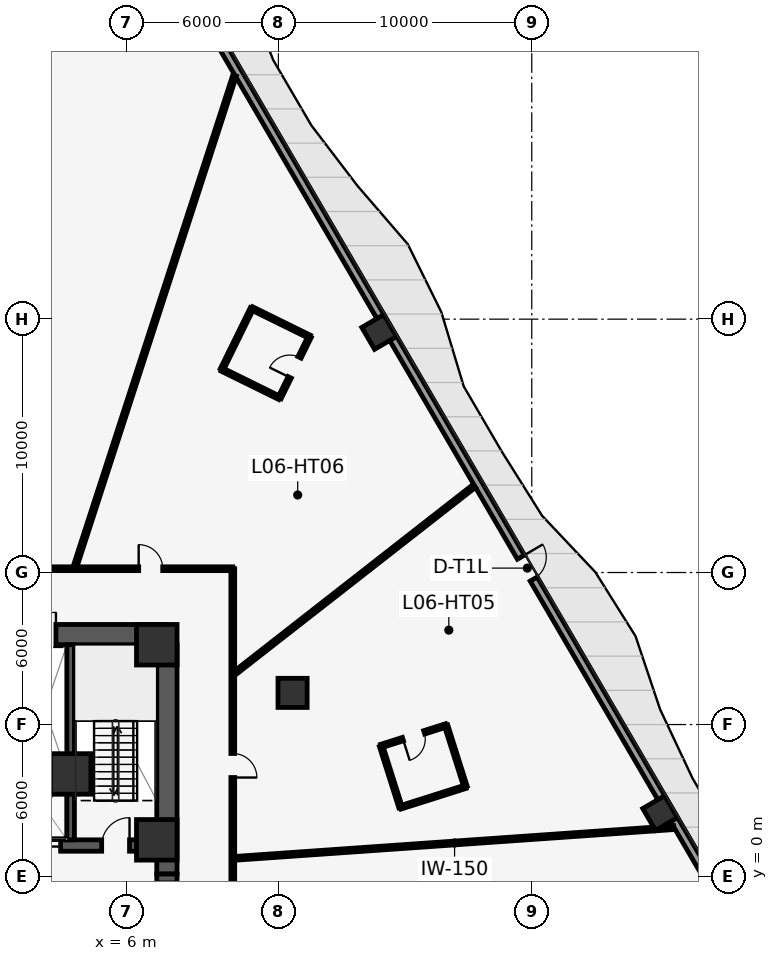
"""IFC4 building model, lengths in metres.
Left out: names, types, materials, properties, quantities, classifications, styles, units other than length and angle.
Written with IfcOpenShell. Run it as: python <this file> out.ifc"""

import sys

from ifc_helpers import new_model, si_unit, direction, frame, frame_2d, origin, origin_2d, place, context, subcontext, project, spatial, rectangle, hollow_rectangle, extrude, element, fill, save


model = new_model("IFC4")
c1 = context("Model", 3, precision=1e-05, world=origin(), true_north=direction((0.0, 1.0)))
c2 = subcontext(c1, "Body", "Model", "MODEL_VIEW")
j1 = project(units=[si_unit("LENGTHUNIT", "METRE"), si_unit("PLANEANGLEUNIT", "RADIAN")], contexts=[c1])
p1 = place(None, origin())
s1 = spatial("IfcSite", under=j1, at=p1, CompositionType="ELEMENT")
p2 = place(p1, origin())
s2 = spatial("IfcBuilding", under=s1, at=p2, CompositionType="ELEMENT")
p3 = place(p2, frame((0.0, 0.0, 34.4)))
s3 = spatial("IfcBuildingStorey", under=s2, at=p3, CompositionType="ELEMENT", Elevation=34.4)
p4 = place(p3, frame((-7.6, 9.55, 0.0), z_axis=(0.0, 0.0, 1.0), x_axis=(1.0, 0.0, 0.0)))
e1 = element("IfcWall", 1, at=p4, inside=s3, PredefinedType="SHEAR", context=c2, shape_type="SweptSolid", body=[
    extrude(rectangle(XDim=15.2, YDim=0.8, at=frame_2d((7.6, 0.0))), origin(), (0.0, 0.0, 1.0), 3.75),
])
p5 = place(p4, frame((7.05, 0.0, 0.0)))
e2 = element("IfcOpeningElement", 2, at=p5, cuts=e1, PredefinedType="OPENING", context=c2, shape_type="SweptSolid", body=[
    extrude(rectangle(XDim=1.1, YDim=2.15, at=frame_2d((0.55, 1.075))), frame((0.0, 0.41, 0.0), z_axis=(0.0, -1.0, 0.0), x_axis=(1.0, 0.0, 0.0)), (0.0, 0.0, 1.0), 0.82),
])
p6 = place(p4, frame((4.38, 0.0, 0.0)))
e3 = element("IfcOpeningElement", 3, at=p6, cuts=e1, PredefinedType="OPENING", context=c2, shape_type="SweptSolid", body=[
    extrude(rectangle(XDim=0.88, YDim=2.15, at=frame_2d((0.44, 1.075))), frame((0.0, 0.41, 0.0), z_axis=(0.0, -1.0, 0.0), x_axis=(1.0, 0.0, 0.0)), (0.0, 0.0, 1.0), 0.82),
])
p7 = place(p4, frame((9.94, 0.0, 0.0)))
e4 = element("IfcOpeningElement", 4, at=p7, cuts=e1, PredefinedType="OPENING", context=c2, shape_type="SweptSolid", body=[
    extrude(rectangle(XDim=0.88, YDim=2.15, at=frame_2d((0.44, 1.075))), frame((0.0, 0.41, 0.0), z_axis=(0.0, -1.0, 0.0), x_axis=(1.0, 0.0, 0.0)), (0.0, 0.0, 1.0), 0.82),
])
p8 = place(p3, frame((-7.2, 1.225, 0.0), z_axis=(0.0, 0.0, 1.0), x_axis=(1.0, 0.0, 0.0)))
e5 = element("IfcWall", 5, at=p8, inside=s3, PredefinedType="SHEAR", context=c2, shape_type="SweptSolid", body=[
    extrude(rectangle(XDim=14.4, YDim=0.45, at=frame_2d((7.2, 0.0))), origin(), (0.0, 0.0, 1.0), 3.75),
])
p9 = place(p8, frame((3.795, 0.0, 0.0)))
e6 = element("IfcOpeningElement", 6, at=p9, cuts=e5, PredefinedType="OPENING", context=c2, shape_type="SweptSolid", body=[
    extrude(rectangle(XDim=1.25, YDim=2.25, at=frame_2d((0.625, 1.125))), frame((0.0, 0.235, 0.0), z_axis=(0.0, -1.0, 0.0), x_axis=(1.0, 0.0, 0.0)), (0.0, 0.0, 1.0), 0.47),
])
p10 = place(p8, frame((9.355, 0.0, 0.0)))
e7 = element("IfcOpeningElement", 7, at=p10, cuts=e5, PredefinedType="OPENING", context=c2, shape_type="SweptSolid", body=[
    extrude(rectangle(XDim=1.25, YDim=2.25, at=frame_2d((0.625, 1.125))), frame((0.0, 0.235, 0.0), z_axis=(0.0, -1.0, 0.0), x_axis=(1.0, 0.0, 0.0)), (0.0, 0.0, 1.0), 0.47),
])
p11 = place(p8, frame((1.075, 0.0, 0.0)))
e8 = element("IfcOpeningElement", 8, at=p11, cuts=e5, PredefinedType="OPENING", context=c2, shape_type="SweptSolid", body=[
    extrude(rectangle(XDim=1.1, YDim=2.15, at=frame_2d((0.55, 1.075))), frame((0.0, 0.235, 0.0), z_axis=(0.0, -1.0, 0.0), x_axis=(1.0, 0.0, 0.0)), (0.0, 0.0, 1.0), 0.47),
])
p12 = place(p8, frame((12.225, 0.0, 0.0)))
e9 = element("IfcOpeningElement", 9, at=p12, cuts=e5, PredefinedType="OPENING", context=c2, shape_type="SweptSolid", body=[
    extrude(rectangle(XDim=1.1, YDim=2.15, at=frame_2d((0.55, 1.075))), frame((0.0, 0.235, 0.0), z_axis=(0.0, -1.0, 0.0), x_axis=(1.0, 0.0, 0.0)), (0.0, 0.0, 1.0), 0.47),
])
p13 = place(p3, frame((3.8, 1.45, 0.0), z_axis=(0.0, 0.0, 1.0), x_axis=(0.0, 1.0, 0.0)))
e10 = element("IfcWall", 10, at=p13, inside=s3, PredefinedType="SHEAR", context=c2, shape_type="SweptSolid", body=[
    extrude(rectangle(XDim=7.7, YDim=0.3, at=frame_2d((3.85, 0.0))), origin(), (0.0, 0.0, 1.0), 3.75),
])
p14 = place(p3, frame((7.6, 0.1, 0.0), z_axis=(0.0, 0.0, 1.0), x_axis=(0.0, 1.0, 0.0)))
e11 = element("IfcWall", 11, at=p14, inside=s3, PredefinedType="SHEAR", context=c2, shape_type="SweptSolid", body=[
    extrude(rectangle(XDim=9.05, YDim=0.8, at=frame_2d((4.525, 0.0))), origin(), (0.0, 0.0, 1.0), 3.75),
])
p15 = place(p3, frame((7.6, -8.85, 0.0), z_axis=(0.0, 0.0, 1.0), x_axis=(0.0, 1.0, 0.0)))
e12 = element("IfcWall", 12, at=p15, inside=s3, PredefinedType="SHEAR", context=c2, shape_type="SweptSolid", body=[
    extrude(rectangle(XDim=8.95, YDim=0.8, at=frame_2d((4.475, 0.0))), origin(), (0.0, 0.0, 1.0), 3.75),
])
p16 = place(p15, frame((2.49, 0.0, 0.0)))
e13 = element("IfcOpeningElement", 13, at=p16, cuts=e12, PredefinedType="OPENING", context=c2, shape_type="SweptSolid", body=[
    extrude(rectangle(XDim=1.8, YDim=2.2, at=frame_2d((0.9, 1.1))), frame((0.0, 0.41, 0.0), z_axis=(0.0, -1.0, 0.0), x_axis=(1.0, 0.0, 0.0)), (0.0, 0.0, 1.0), 0.82),
])
p17 = place(p15, frame((7.4, 0.0, 0.0)))
e14 = element("IfcOpeningElement", 14, at=p17, cuts=e12, PredefinedType="OPENING", context=c2, shape_type="SweptSolid", body=[
    extrude(rectangle(XDim=1.2, YDim=2.15, at=frame_2d((0.6, 1.075))), frame((0.0, 0.41, 0.0), z_axis=(0.0, -1.0, 0.0), x_axis=(1.0, 0.0, 0.0)), (0.0, 0.0, 1.0), 0.82),
])
for number, where, z_axis, x_axis in (
    (15, (7.2, 1.45, 0.0), (0.0, 0.0, 1.0), (1.0, 0.0, 0.0)),
    (16, (7.2, 9.15, 0.0), (0.0, 0.0, 1.0), (1.0, 0.0, 0.0)),
    (17, (3.8, 4.05, 0.0), (0.0, 0.0, 1.0), (1.0, 0.0, 0.0)),
):
    element("IfcColumn", number, at=place(p3, frame(where, z_axis=z_axis, x_axis=x_axis)), inside=s3, PredefinedType="COLUMN", context=c2, shape_type="SweptSolid", body=[
        extrude(rectangle(XDim=1.6, YDim=1.6, at=origin_2d()), origin(), (0.0, 0.0, 1.0), 4.0),
    ])
p18 = place(p3, frame((12.56, 7.25, 0.0), z_axis=(0.0, 0.0, 1.0), x_axis=(1.0, 0.0, 0.0)))
e18 = element("IfcColumn", 18, at=p18, inside=s3, PredefinedType="COLUMN", context=c2, shape_type="SweptSolid", body=[
    extrude(rectangle(XDim=1.15, YDim=1.15, at=origin_2d()), origin(), (0.0, 0.0, 1.0), 4.0),
])
for number, where, z_axis, x_axis in (
    (19, (27.065, 2.506, 0.0), (0.0, 0.0, 1.0), (-0.504, 0.863, 0.0)),
    (20, (15.976, 21.494, 0.0), (0.0, 0.0, 1.0), (-0.504, 0.863, 0.0)),
):
    element("IfcColumn", number, at=place(p3, frame(where, z_axis=z_axis, x_axis=x_axis)), inside=s3, PredefinedType="COLUMN", context=c2, shape_type="SweptSolid", body=[
        extrude(hollow_rectangle(XDim=1.0, YDim=1.0, WallThickness=0.06, at=origin_2d()), origin(), (0.0, 0.0, 1.0), 4.0),
    ])
p19 = place(p3, frame((4.923, 41.122, 0.0), z_axis=(0.0, 0.0, 1.0), x_axis=(0.504213113214, -0.863579258935, 0.0)))
e21 = element("IfcWall", 21, at=p19, inside=s3, PredefinedType="STANDARD", context=c2, shape_type="SweptSolid", body=[
    extrude(rectangle(XDim=67.041, YDim=0.32, at=frame_2d((33.521, 0.0))), origin(), (0.0, 0.0, 1.0), 3.75),
])
p20 = place(p19, frame((33.021, 0.0, 0.0)))
e22 = element("IfcOpeningElement", 22, at=p20, cuts=e21, PredefinedType="OPENING", context=c2, shape_type="SweptSolid", body=[
    extrude(rectangle(XDim=1.0, YDim=2.15, at=frame_2d((0.5, 1.075))), frame((0.0, 0.17, 0.0), z_axis=(0.0, -1.0, 0.0), x_axis=(1.0, 0.0, 0.0)), (0.0, 0.0, 1.0), 0.34),
])
p21 = place(p3, frame((1.92, 4.05, 0.0), z_axis=(0.0, 0.0, 1.0), x_axis=(1.0, 0.0, 0.0)))
e23 = element("IfcWall", 23, at=p21, inside=s3, PredefinedType="PARTITIONING", context=c2, shape_type="SweptSolid", body=[
    extrude(rectangle(XDim=1.73, YDim=0.2, at=frame_2d((0.865, 0.0))), origin(), (0.0, 0.0, 1.0), 3.75),
])
p22 = place(p3, frame((-10.2, 12.15, 0.0), z_axis=(0.0, 0.0, 1.0), x_axis=(1.0, 0.0, 0.0)))
e24 = element("IfcWall", 24, at=p22, inside=s3, PredefinedType="PARTITIONING", context=c2, shape_type="SweptSolid", body=[
    extrude(rectangle(XDim=20.4, YDim=0.15, at=frame_2d((10.2, 0.0))), origin(), (0.0, 0.0, 1.0), 3.75),
])
p23 = place(p22, frame((16.686, 0.0, 0.0)))
e25 = element("IfcOpeningElement", 25, at=p23, cuts=e24, PredefinedType="OPENING", context=c2, shape_type="SweptSolid", body=[
    extrude(rectangle(XDim=0.95, YDim=2.15, at=frame_2d((0.475, 1.075))), frame((0.0, 0.085, 0.0), z_axis=(0.0, -1.0, 0.0), x_axis=(1.0, 0.0, 0.0)), (0.0, 0.0, 1.0), 0.17),
])
p24 = place(p22, frame((9.725, 0.0, 0.0)))
e26 = element("IfcOpeningElement", 26, at=p24, cuts=e24, PredefinedType="OPENING", context=c2, shape_type="SweptSolid", body=[
    extrude(rectangle(XDim=0.95, YDim=2.15, at=frame_2d((0.475, 1.075))), frame((0.0, 0.085, 0.0), z_axis=(0.0, -1.0, 0.0), x_axis=(1.0, 0.0, 0.0)), (0.0, 0.0, 1.0), 0.17),
])
p25 = place(p22, frame((2.764, 0.0, 0.0)))
e27 = element("IfcOpeningElement", 27, at=p25, cuts=e24, PredefinedType="OPENING", context=c2, shape_type="SweptSolid", body=[
    extrude(rectangle(XDim=0.95, YDim=2.15, at=frame_2d((0.475, 1.075))), frame((0.0, 0.085, 0.0), z_axis=(0.0, -1.0, 0.0), x_axis=(1.0, 0.0, 0.0)), (0.0, 0.0, 1.0), 0.17),
])
p26 = place(p3, frame((10.2, 12.15, 0.0), z_axis=(0.0, 0.0, 1.0), x_axis=(0.0, -1.0, 0.0)))
e28 = element("IfcWall", 28, at=p26, inside=s3, PredefinedType="PARTITIONING", context=c2, shape_type="SweptSolid", body=[
    extrude(rectangle(XDim=24.0, YDim=0.15, at=frame_2d((12.0, 0.0))), origin(), (0.0, 0.0, 1.0), 3.75),
])
p27 = place(p26, frame((20.211, 0.0, 0.0)))
e29 = element("IfcOpeningElement", 29, at=p27, cuts=e28, PredefinedType="OPENING", context=c2, shape_type="SweptSolid", body=[
    extrude(rectangle(XDim=0.95, YDim=2.15, at=frame_2d((0.475, 1.075))), frame((0.0, 0.085, 0.0), z_axis=(0.0, -1.0, 0.0), x_axis=(1.0, 0.0, 0.0)), (0.0, 0.0, 1.0), 0.17),
])
p28 = place(p26, frame((14.05, 0.0, 0.0)))
e30 = element("IfcOpeningElement", 30, at=p28, cuts=e28, PredefinedType="OPENING", context=c2, shape_type="SweptSolid", body=[
    extrude(rectangle(XDim=0.95, YDim=2.15, at=frame_2d((0.475, 1.075))), frame((0.0, 0.085, 0.0), z_axis=(0.0, -1.0, 0.0), x_axis=(1.0, 0.0, 0.0)), (0.0, 0.0, 1.0), 0.17),
])
p29 = place(p26, frame((7.292, 0.0, 0.0)))
e31 = element("IfcOpeningElement", 31, at=p29, cuts=e28, PredefinedType="OPENING", context=c2, shape_type="SweptSolid", body=[
    extrude(rectangle(XDim=0.95, YDim=2.15, at=frame_2d((0.475, 1.075))), frame((0.0, 0.085, 0.0), z_axis=(0.0, -1.0, 0.0), x_axis=(1.0, 0.0, 0.0)), (0.0, 0.0, 1.0), 0.17),
])
p30 = place(p3, frame((10.305, 0.721, 0.0), z_axis=(0.0, 0.0, 1.0), x_axis=(0.997564495515, 0.069750106007, 0.0)))
e32 = element("IfcWall", 32, at=p30, inside=s3, PredefinedType="PARTITIONING", context=c2, shape_type="SweptSolid", body=[
    extrude(rectangle(XDim=17.34, YDim=0.15, at=frame_2d((8.67, 0.0))), origin(), (0.0, 0.0, 1.0), 3.75),
])
p31 = place(p3, frame((10.305, 8.051, 0.0), z_axis=(0.0, 0.0, 1.0), x_axis=(0.788008281042, 0.615664640051, 0.0)))
e33 = element("IfcWall", 33, at=p31, inside=s3, PredefinedType="PARTITIONING", context=c2, shape_type="SweptSolid", body=[
    extrude(rectangle(XDim=11.96, YDim=0.15, at=frame_2d((5.98, 0.0))), origin(), (0.0, 0.0, 1.0), 3.75),
])
p32 = place(p3, frame((3.982, 12.255, 0.0), z_axis=(0.0, 0.0, 1.0), x_axis=(0.309011216684, 0.951058393561, 0.0)))
e34 = element("IfcWall", 34, at=p32, inside=s3, PredefinedType="PARTITIONING", context=c2, shape_type="SweptSolid", body=[
    extrude(rectangle(XDim=20.354, YDim=0.15, at=frame_2d((10.177, 0.0))), origin(), (0.0, 0.0, 1.0), 3.75),
])
p33 = place(p3, frame((16.822, 2.731, 0.0), z_axis=(0.0, 0.0, 1.0), x_axis=(0.953175772707, 0.302416841998, 0.0)))
e35 = element("IfcWall", 35, at=p33, inside=s3, PredefinedType="PARTITIONING", context=c2, shape_type="SweptSolid", body=[
    extrude(rectangle(XDim=2.69, YDim=0.14, at=frame_2d((1.345, 0.0))), origin(), (0.0, 0.0, 1.0), 3.75),
])
p34 = place(p3, frame((19.386, 3.544, 0.0), z_axis=(0.0, 0.0, 1.0), x_axis=(-0.302382317173, 0.953186725811, 0.0)))
e36 = element("IfcWall", 36, at=p34, inside=s3, PredefinedType="PARTITIONING", context=c2, shape_type="SweptSolid", body=[
    extrude(rectangle(XDim=2.54, YDim=0.14, at=frame_2d((1.27, 0.0))), origin(), (0.0, 0.0, 1.0), 3.75),
])
p35 = place(p3, frame((18.618, 5.965, 0.0), z_axis=(0.0, 0.0, 1.0), x_axis=(-0.953184072296, -0.302390681604, 0.0)))
e37 = element("IfcWall", 37, at=p35, inside=s3, PredefinedType="PARTITIONING", context=c2, shape_type="SweptSolid", body=[
    extrude(rectangle(XDim=2.69, YDim=0.14, at=frame_2d((1.345, 0.0))), origin(), (0.0, 0.0, 1.0), 3.75),
])
p36 = place(p35, frame((0.905, 0.0, 0.0)))
e38 = element("IfcOpeningElement", 38, at=p36, cuts=e37, PredefinedType="OPENING", context=c2, shape_type="SweptSolid", body=[
    extrude(rectangle(XDim=0.88, YDim=2.1, at=frame_2d((0.44, 1.05))), frame((0.0, 0.08, 0.0), z_axis=(0.0, -1.0, 0.0), x_axis=(1.0, 0.0, 0.0)), (0.0, 0.0, 1.0), 0.16),
])
p37 = place(p3, frame((16.054, 5.152, 0.0), z_axis=(0.0, 0.0, 1.0), x_axis=(0.302469641391, -0.953159019281, 0.0)))
e39 = element("IfcWall", 39, at=p37, inside=s3, PredefinedType="PARTITIONING", context=c2, shape_type="SweptSolid", body=[
    extrude(rectangle(XDim=2.54, YDim=0.14, at=frame_2d((1.27, 0.0))), origin(), (0.0, 0.0, 1.0), 3.75),
])
p38 = place(p3, frame((12.046, 18.89, 0.0), z_axis=(0.0, 0.0, 1.0), x_axis=(0.441505331812, 0.897258626028, 0.0)))
e40 = element("IfcWall", 40, at=p38, inside=s3, PredefinedType="PARTITIONING", context=c2, shape_type="SweptSolid", body=[
    extrude(rectangle(XDim=2.69, YDim=0.14, at=frame_2d((1.345, 0.0))), origin(), (0.0, 0.0, 1.0), 3.75),
])
p39 = place(p38, frame((0.905, 0.0, 0.0)))
e41 = element("IfcOpeningElement", 41, at=p39, cuts=e40, PredefinedType="OPENING", context=c2, shape_type="SweptSolid", body=[
    extrude(rectangle(XDim=0.88, YDim=2.1, at=frame_2d((0.44, 1.05))), frame((0.0, 0.08, 0.0), z_axis=(0.0, -1.0, 0.0), x_axis=(1.0, 0.0, 0.0)), (0.0, 0.0, 1.0), 0.16),
])
p40 = place(p3, frame((13.234, 21.304, 0.0), z_axis=(0.0, 0.0, 1.0), x_axis=(-0.897273198593, 0.441475715173, 0.0)))
e42 = element("IfcWall", 42, at=p40, inside=s3, PredefinedType="PARTITIONING", context=c2, shape_type="SweptSolid", body=[
    extrude(rectangle(XDim=2.54, YDim=0.14, at=frame_2d((1.27, 0.0))), origin(), (0.0, 0.0, 1.0), 3.75),
])
p41 = place(p3, frame((10.955, 22.425, 0.0), z_axis=(0.0, 0.0, 1.0), x_axis=(-0.441541285032, -0.897240933982, 0.0)))
e43 = element("IfcWall", 43, at=p41, inside=s3, PredefinedType="PARTITIONING", context=c2, shape_type="SweptSolid", body=[
    extrude(rectangle(XDim=2.69, YDim=0.14, at=frame_2d((1.345, 0.0))), origin(), (0.0, 0.0, 1.0), 3.75),
])
p42 = place(p3, frame((9.767, 20.011, 0.0), z_axis=(0.0, 0.0, 1.0), x_axis=(0.897235121698, -0.441553095777, 0.0)))
e44 = element("IfcWall", 44, at=p42, inside=s3, PredefinedType="PARTITIONING", context=c2, shape_type="SweptSolid", body=[
    extrude(rectangle(XDim=2.54, YDim=0.14, at=frame_2d((1.27, 0.0))), origin(), (0.0, 0.0, 1.0), 3.75),
])
p43 = place(p20, origin())
e45 = element("IfcDoor", 45, at=p43, inside=s3, OperationType="SINGLE_SWING_LEFT", PredefinedType="DOOR", context=c2, shape_type="SweptSolid", body=[
    extrude(rectangle(XDim=1.0, YDim=2.15, at=frame_2d((0.5, 1.075))), frame((0.0, 0.025, 0.0), z_axis=(0.0, -1.0, 0.0), x_axis=(1.0, 0.0, 0.0)), (0.0, 0.0, 1.0), 0.05),
])
fill(e22, e45)
p44 = place(p10, origin())
e46 = element("IfcDoor", 46, at=p44, inside=s3, OperationType="DOUBLE_DOOR_SLIDING", PredefinedType="DOOR", context=c2, shape_type="SweptSolid", body=[
    extrude(rectangle(XDim=1.25, YDim=2.25, at=frame_2d((0.625, 1.125))), frame((0.0, 0.025, 0.0), z_axis=(0.0, -1.0, 0.0), x_axis=(1.0, 0.0, 0.0)), (0.0, 0.0, 1.0), 0.05),
])
fill(e7, e46)
p45 = place(p12, origin())
e47 = element("IfcDoor", 47, at=p45, inside=s3, OperationType="SINGLE_SWING_RIGHT", PredefinedType="DOOR", context=c2, shape_type="SweptSolid", body=[
    extrude(rectangle(XDim=1.1, YDim=2.15, at=frame_2d((0.55, 1.075))), frame((0.0, 0.025, 0.0), z_axis=(0.0, -1.0, 0.0), x_axis=(1.0, 0.0, 0.0)), (0.0, 0.0, 1.0), 0.05),
])
fill(e9, e47)
p46 = place(p7, origin())
e48 = element("IfcDoor", 48, at=p46, inside=s3, OperationType="SINGLE_SWING_RIGHT", PredefinedType="DOOR", context=c2, shape_type="SweptSolid", body=[
    extrude(rectangle(XDim=0.88, YDim=2.15, at=frame_2d((0.44, 1.075))), frame((0.0, 0.025, 0.0), z_axis=(0.0, -1.0, 0.0), x_axis=(1.0, 0.0, 0.0)), (0.0, 0.0, 1.0), 0.05),
])
fill(e4, e48)
p47 = place(p36, origin())
e49 = element("IfcDoor", 49, at=p47, inside=s3, OperationType="SINGLE_SWING_RIGHT", PredefinedType="DOOR", context=c2, shape_type="SweptSolid", body=[
    extrude(rectangle(XDim=0.88, YDim=2.1, at=frame_2d((0.44, 1.05))), frame((0.0, 0.025, 0.0), z_axis=(0.0, -1.0, 0.0), x_axis=(1.0, 0.0, 0.0)), (0.0, 0.0, 1.0), 0.05),
])
fill(e38, e49)
p48 = place(p39, origin())
e50 = element("IfcDoor", 50, at=p48, inside=s3, OperationType="SINGLE_SWING_LEFT", PredefinedType="DOOR", context=c2, shape_type="SweptSolid", body=[
    extrude(rectangle(XDim=0.88, YDim=2.1, at=frame_2d((0.44, 1.05))), frame((0.0, 0.025, 0.0), z_axis=(0.0, -1.0, 0.0), x_axis=(1.0, 0.0, 0.0)), (0.0, 0.0, 1.0), 0.05),
])
fill(e41, e50)
p49 = place(p29, origin())
e51 = element("IfcDoor", 51, at=p49, inside=s3, OperationType="SINGLE_SWING_RIGHT", PredefinedType="DOOR", context=c2, shape_type="SweptSolid", body=[
    extrude(rectangle(XDim=0.95, YDim=2.15, at=frame_2d((0.475, 1.075))), frame((0.0, 0.025, 0.0), z_axis=(0.0, -1.0, 0.0), x_axis=(1.0, 0.0, 0.0)), (0.0, 0.0, 1.0), 0.05),
])
fill(e31, e51)
p50 = place(p23, origin())
e52 = element("IfcDoor", 52, at=p50, inside=s3, OperationType="SINGLE_SWING_LEFT", PredefinedType="DOOR", context=c2, shape_type="SweptSolid", body=[
    extrude(rectangle(XDim=0.95, YDim=2.15, at=frame_2d((0.475, 1.075))), frame((0.0, 0.025, 0.0), z_axis=(0.0, -1.0, 0.0), x_axis=(1.0, 0.0, 0.0)), (0.0, 0.0, 1.0), 0.05),
])
fill(e25, e52)
save(model, sys.argv[1])
